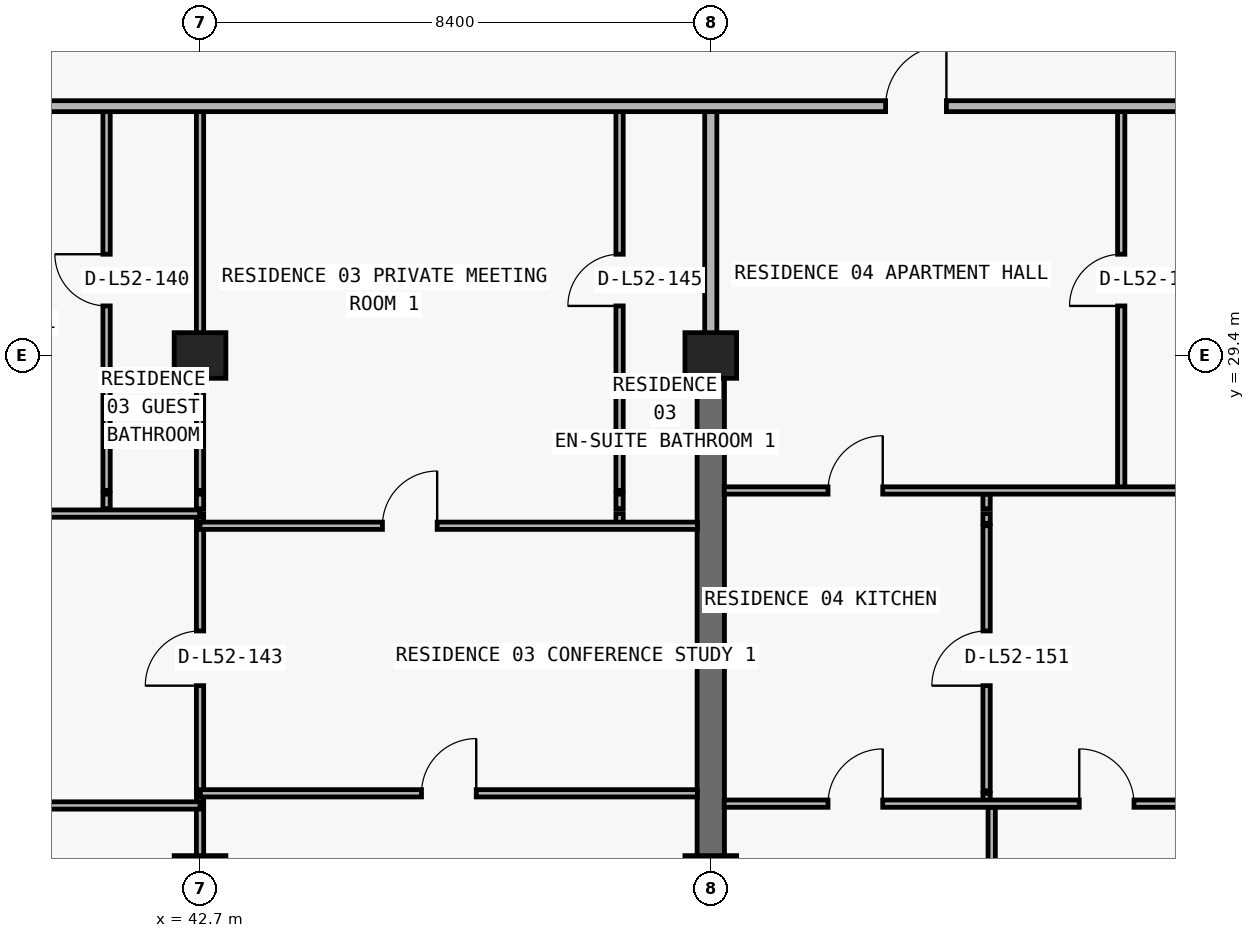
"""IFC4 building model, lengths in metres.
Left out: names, types, materials, properties, quantities, classifications, styles, units other than length and angle.
Written with IfcOpenShell. Run it as: python <this file> out.ifc"""

import sys

from ifc_helpers import new_model, si_unit, direction, frame, frame_2d, origin, origin_2d, place, context, subcontext, project, spatial, rectangle, extrude, element, fill, save


model = new_model("IFC4")
c1 = context("Model", 3, precision=1e-05, world=origin(), true_north=direction((0.0, 1.0)))
c2 = subcontext(c1, "Body", "Model", "MODEL_VIEW")
j1 = project(units=[si_unit("LENGTHUNIT", "METRE"), si_unit("PLANEANGLEUNIT", "RADIAN")], contexts=[c1])
p1 = place(None, origin())
s1 = spatial("IfcSite", under=j1, at=p1, CompositionType="ELEMENT")
p2 = place(p1, origin())
s2 = spatial("IfcBuilding", under=s1, at=p2, CompositionType="ELEMENT")
p3 = place(p2, frame((0.0, 0.0, 188.4)))
s3 = spatial("IfcBuildingStorey", under=s2, at=p3, CompositionType="ELEMENT", Elevation=188.4)
for number, where, z_axis, x_axis in (
    (1, (42.7, 20.8, 0.0), (0.0, 0.0, 1.0), (1.0, 0.0, 0.0)),
    (2, (51.1, 20.8, 0.0), (0.0, 0.0, 1.0), (1.0, 0.0, 0.0)),
    (3, (42.7, 29.4, 0.0), (0.0, 0.0, 1.0), (1.0, 0.0, 0.0)),
    (4, (51.1, 29.4, 0.0), (0.0, 0.0, 1.0), (1.0, 0.0, 0.0)),
):
    element("IfcColumn", number, at=place(p3, frame(where, z_axis=z_axis, x_axis=x_axis)), inside=s3, PredefinedType="COLUMN", context=c2, shape_type="SweptSolid", body=[
        extrude(rectangle(XDim=0.85, YDim=0.75, at=origin_2d()), origin(), (0.0, 0.0, 1.0), 3.05),
    ])
p4 = place(p3, frame((51.1, 20.8, 0.0), z_axis=(0.0, 0.0, 1.0), x_axis=(0.0, 1.0, 0.0)))
e5 = element("IfcWall", 5, at=p4, inside=s3, PredefinedType="SHEAR", context=c2, shape_type="SweptSolid", body=[
    extrude(rectangle(XDim=8.6, YDim=0.45, at=frame_2d((4.3, 0.0))), origin(), (0.0, 0.0, 1.0), 3.05),
])
p5 = place(p3, frame((41.163, 26.88, 0.0), z_axis=(0.0, 0.0, 1.0), x_axis=(0.0, 1.0, 0.0)))
e6 = element("IfcWall", 6, at=p5, inside=s3, PredefinedType="PARTITIONING", context=c2, shape_type="SweptSolid", body=[
    extrude(rectangle(XDim=0.24, YDim=0.12, at=frame_2d((0.12, 0.0))), origin(), (0.0, 0.0, 1.0), 3.05),
])
p6 = place(p3, frame((41.163, 27.18, 0.0), z_axis=(0.0, 0.0, 1.0), x_axis=(0.0, 1.0, 0.0)))
e7 = element("IfcWall", 7, at=p6, inside=s3, PredefinedType="PARTITIONING", context=c2, shape_type="SweptSolid", body=[
    extrude(rectangle(XDim=6.32, YDim=0.12, at=frame_2d((3.16, 0.0))), origin(), (0.0, 0.0, 1.0), 3.05),
])
p7 = place(p6, frame((3.035, 0.0, 0.0)))
e8 = element("IfcOpeningElement", 8, at=p7, cuts=e7, PredefinedType="OPENING", context=c2, shape_type="SweptSolid", body=[
    extrude(rectangle(XDim=0.85, YDim=2.1, at=frame_2d((0.425, 1.05))), frame((0.0, 0.07, 0.0), z_axis=(0.0, -1.0, 0.0), x_axis=(1.0, 0.0, 0.0)), (0.0, 0.0, 1.0), 0.14),
])
p8 = place(p3, frame((42.7, 11.24, 0.0), z_axis=(0.0, 0.0, 1.0), x_axis=(0.0, 1.0, 0.0)))
e9 = element("IfcWall", 9, at=p8, inside=s3, PredefinedType="PARTITIONING", context=c2, shape_type="SweptSolid", body=[
    extrude(rectangle(XDim=10.73, YDim=0.12, at=frame_2d((5.365, 0.0))), origin(), (0.0, 0.0, 1.0), 2.263),
])
p9 = place(p3, frame((42.7, 22.04, 0.0), z_axis=(0.0, 0.0, 1.0), x_axis=(0.0, 1.0, 0.0)))
e10 = element("IfcWall", 10, at=p9, inside=s3, PredefinedType="PARTITIONING", context=c2, shape_type="SweptSolid", body=[
    extrude(rectangle(XDim=0.16, YDim=0.12, at=frame_2d((0.08, 0.0))), origin(), (0.0, 0.0, 1.0), 2.263),
])
p10 = place(p3, frame((42.7, 22.24, 0.0), z_axis=(0.0, 0.0, 1.0), x_axis=(0.0, 1.0, 0.0)))
e11 = element("IfcWall", 11, at=p10, inside=s3, PredefinedType="PARTITIONING", context=c2, shape_type="SweptSolid", body=[
    extrude(rectangle(XDim=4.36, YDim=0.12, at=frame_2d((2.18, 0.0))), origin(), (0.0, 0.0, 1.0), 2.263),
])
p11 = place(p10, frame((1.73, 0.0, 0.0)))
e12 = element("IfcOpeningElement", 12, at=p11, cuts=e11, PredefinedType="OPENING", context=c2, shape_type="SweptSolid", body=[
    extrude(rectangle(XDim=0.9, YDim=2.15, at=frame_2d((0.45, 1.075))), frame((0.0, 0.07, 0.0), z_axis=(0.0, -1.0, 0.0), x_axis=(1.0, 0.0, 0.0)), (0.0, 0.0, 1.0), 0.14),
])
p12 = place(p3, frame((42.7, 26.64, 0.0), z_axis=(0.0, 0.0, 1.0), x_axis=(0.0, 1.0, 0.0)))
e13 = element("IfcWall", 13, at=p12, inside=s3, PredefinedType="PARTITIONING", context=c2, shape_type="SweptSolid", body=[
    extrude(rectangle(XDim=0.16, YDim=0.12, at=frame_2d((0.08, 0.0))), origin(), (0.0, 0.0, 1.0), 2.263),
])
p13 = place(p3, frame((42.7, 26.88, 0.0), z_axis=(0.0, 0.0, 1.0), x_axis=(0.0, 1.0, 0.0)))
e14 = element("IfcWall", 14, at=p13, inside=s3, PredefinedType="PARTITIONING", context=c2, shape_type="SweptSolid", body=[
    extrude(rectangle(XDim=0.24, YDim=0.12, at=frame_2d((0.12, 0.0))), origin(), (0.0, 0.0, 1.0), 2.263),
])
p14 = place(p3, frame((42.7, 27.18, 0.0), z_axis=(0.0, 0.0, 1.0), x_axis=(0.0, 1.0, 0.0)))
e15 = element("IfcWall", 15, at=p14, inside=s3, PredefinedType="PARTITIONING", context=c2, shape_type="SweptSolid", body=[
    extrude(rectangle(XDim=6.32, YDim=0.12, at=frame_2d((3.16, 0.0))), origin(), (0.0, 0.0, 1.0), 2.263),
])
p15 = place(p3, frame((49.6, 26.64, 0.0), z_axis=(0.0, 0.0, 1.0), x_axis=(0.0, 1.0, 0.0)))
e16 = element("IfcWall", 16, at=p15, inside=s3, PredefinedType="PARTITIONING", context=c2, shape_type="SweptSolid", body=[
    extrude(rectangle(XDim=0.16, YDim=0.12, at=frame_2d((0.08, 0.0))), origin(), (0.0, 0.0, 1.0), 3.05),
])
p16 = place(p3, frame((49.6, 26.88, 0.0), z_axis=(0.0, 0.0, 1.0), x_axis=(0.0, 1.0, 0.0)))
e17 = element("IfcWall", 17, at=p16, inside=s3, PredefinedType="PARTITIONING", context=c2, shape_type="SweptSolid", body=[
    extrude(rectangle(XDim=0.24, YDim=0.12, at=frame_2d((0.12, 0.0))), origin(), (0.0, 0.0, 1.0), 3.05),
])
p17 = place(p3, frame((49.6, 27.18, 0.0), z_axis=(0.0, 0.0, 1.0), x_axis=(0.0, 1.0, 0.0)))
e18 = element("IfcWall", 18, at=p17, inside=s3, PredefinedType="PARTITIONING", context=c2, shape_type="SweptSolid", body=[
    extrude(rectangle(XDim=6.32, YDim=0.12, at=frame_2d((3.16, 0.0))), origin(), (0.0, 0.0, 1.0), 3.05),
])
p18 = place(p17, frame((3.035, 0.0, 0.0)))
e19 = element("IfcOpeningElement", 19, at=p18, cuts=e18, PredefinedType="OPENING", context=c2, shape_type="SweptSolid", body=[
    extrude(rectangle(XDim=0.85, YDim=2.1, at=frame_2d((0.425, 1.05))), frame((0.0, 0.07, 0.0), z_axis=(0.0, -1.0, 0.0), x_axis=(1.0, 0.0, 0.0)), (0.0, 0.0, 1.0), 0.14),
])
p19 = place(p3, frame((51.1, 29.405, 0.0), z_axis=(0.0, 0.0, 1.0), x_axis=(0.0, 1.0, 0.0)))
e20 = element("IfcWall", 20, at=p19, inside=s3, PredefinedType="PARTITIONING", context=c2, shape_type="SweptSolid", body=[
    extrude(rectangle(XDim=4.095, YDim=0.2, at=frame_2d((2.047, 0.0))), origin(), (0.0, 0.0, 1.0), 2.335),
])
p20 = place(p3, frame((55.636, 22.04, 0.0), z_axis=(0.0, 0.0, 1.0), x_axis=(0.0, 1.0, 0.0)))
e21 = element("IfcWall", 21, at=p20, inside=s3, PredefinedType="PARTITIONING", context=c2, shape_type="SweptSolid", body=[
    extrude(rectangle(XDim=0.16, YDim=0.12, at=frame_2d((0.08, 0.0))), origin(), (0.0, 0.0, 1.0), 3.05),
])
p21 = place(p3, frame((55.636, 22.24, 0.0), z_axis=(0.0, 0.0, 1.0), x_axis=(0.0, 1.0, 0.0)))
e22 = element("IfcWall", 22, at=p21, inside=s3, PredefinedType="PARTITIONING", context=c2, shape_type="SweptSolid", body=[
    extrude(rectangle(XDim=4.36, YDim=0.12, at=frame_2d((2.18, 0.0))), origin(), (0.0, 0.0, 1.0), 3.05),
])
p22 = place(p21, frame((1.73, 0.0, 0.0)))
e23 = element("IfcOpeningElement", 23, at=p22, cuts=e22, PredefinedType="OPENING", context=c2, shape_type="SweptSolid", body=[
    extrude(rectangle(XDim=0.9, YDim=2.15, at=frame_2d((0.45, 1.075))), frame((0.0, 0.07, 0.0), z_axis=(0.0, -1.0, 0.0), x_axis=(1.0, 0.0, 0.0)), (0.0, 0.0, 1.0), 0.14),
])
p23 = place(p3, frame((55.636, 26.64, 0.0), z_axis=(0.0, 0.0, 1.0), x_axis=(0.0, 1.0, 0.0)))
e24 = element("IfcWall", 24, at=p23, inside=s3, PredefinedType="PARTITIONING", context=c2, shape_type="SweptSolid", body=[
    extrude(rectangle(XDim=0.16, YDim=0.12, at=frame_2d((0.08, 0.0))), origin(), (0.0, 0.0, 1.0), 3.05),
])
p24 = place(p3, frame((55.636, 26.88, 0.0), z_axis=(0.0, 0.0, 1.0), x_axis=(0.0, 1.0, 0.0)))
e25 = element("IfcWall", 25, at=p24, inside=s3, PredefinedType="PARTITIONING", context=c2, shape_type="SweptSolid", body=[
    extrude(rectangle(XDim=0.24, YDim=0.12, at=frame_2d((0.12, 0.0))), origin(), (0.0, 0.0, 1.0), 3.05),
])
p25 = place(p3, frame((55.72, 11.24, 0.0), z_axis=(0.0, 0.0, 1.0), x_axis=(0.0, 1.0, 0.0)))
e26 = element("IfcWall", 26, at=p25, inside=s3, PredefinedType="PARTITIONING", context=c2, shape_type="SweptSolid", body=[
    extrude(rectangle(XDim=10.73, YDim=0.12, at=frame_2d((5.365, 0.0))), origin(), (0.0, 0.0, 1.0), 3.05),
])
p26 = place(p3, frame((57.85, 27.18, 0.0), z_axis=(0.0, 0.0, 1.0), x_axis=(0.0, 1.0, 0.0)))
e27 = element("IfcWall", 27, at=p26, inside=s3, PredefinedType="PARTITIONING", context=c2, shape_type="SweptSolid", body=[
    extrude(rectangle(XDim=6.32, YDim=0.12, at=frame_2d((3.16, 0.0))), origin(), (0.0, 0.0, 1.0), 3.05),
])
p27 = place(p26, frame((3.035, 0.0, 0.0)))
e28 = element("IfcOpeningElement", 28, at=p27, cuts=e27, PredefinedType="OPENING", context=c2, shape_type="SweptSolid", body=[
    extrude(rectangle(XDim=0.85, YDim=2.1, at=frame_2d((0.425, 1.05))), frame((0.0, 0.07, 0.0), z_axis=(0.0, -1.0, 0.0), x_axis=(1.0, 0.0, 0.0)), (0.0, 0.0, 1.0), 0.14),
])
p28 = place(p3, frame((35.105, 22.0, 0.0), z_axis=(0.0, 0.0, 1.0), x_axis=(1.0, 0.0, 0.0)))
e29 = element("IfcWall", 29, at=p28, inside=s3, PredefinedType="PARTITIONING", context=c2, shape_type="SweptSolid", body=[
    extrude(rectangle(XDim=7.595, YDim=0.12, at=frame_2d((3.797, 0.0))), origin(), (0.0, 0.0, 1.0), 3.05),
])
p29 = place(p28, frame((3.347, 0.0, 0.0)))
e30 = element("IfcOpeningElement", 30, at=p29, cuts=e29, PredefinedType="OPENING", context=c2, shape_type="SweptSolid", body=[
    extrude(rectangle(XDim=0.9, YDim=2.15, at=frame_2d((0.45, 1.075))), frame((0.0, 0.07, 0.0), z_axis=(0.0, -1.0, 0.0), x_axis=(1.0, 0.0, 0.0)), (0.0, 0.0, 1.0), 0.14),
])
p30 = place(p3, frame((51.32, 22.03, 0.0), z_axis=(0.0, 0.0, 1.0), x_axis=(1.0, 0.0, 0.0)))
e31 = element("IfcWall", 31, at=p30, inside=s3, PredefinedType="PARTITIONING", context=c2, shape_type="SweptSolid", body=[
    extrude(rectangle(XDim=8.18, YDim=0.12, at=frame_2d((4.09, 0.0))), origin(), (0.0, 0.0, 1.0), 3.05),
])
p31 = place(p30, frame((1.708, 0.0, 0.0)))
e32 = element("IfcOpeningElement", 32, at=p31, cuts=e31, PredefinedType="OPENING", context=c2, shape_type="SweptSolid", body=[
    extrude(rectangle(XDim=0.9, YDim=2.15, at=frame_2d((0.45, 1.075))), frame((0.0, 0.07, 0.0), z_axis=(0.0, -1.0, 0.0), x_axis=(1.0, 0.0, 0.0)), (0.0, 0.0, 1.0), 0.14),
])
p32 = place(p30, frame((5.84, 0.0, 0.0)))
e33 = element("IfcOpeningElement", 33, at=p32, cuts=e31, PredefinedType="OPENING", context=c2, shape_type="SweptSolid", body=[
    extrude(rectangle(XDim=0.9, YDim=2.15, at=frame_2d((0.45, 1.075))), frame((0.0, 0.07, 0.0), z_axis=(0.0, -1.0, 0.0), x_axis=(1.0, 0.0, 0.0)), (0.0, 0.0, 1.0), 0.14),
])
p33 = place(p3, frame((42.705, 22.2, 0.0), z_axis=(0.0, 0.0, 1.0), x_axis=(1.0, 0.0, 0.0)))
e34 = element("IfcWall", 34, at=p33, inside=s3, PredefinedType="PARTITIONING", context=c2, shape_type="SweptSolid", body=[
    extrude(rectangle(XDim=8.175, YDim=0.12, at=frame_2d((4.087, 0.0))), origin(), (0.0, 0.0, 1.0), 3.05),
])
p34 = place(p33, frame((3.637, 0.0, 0.0)))
e35 = element("IfcOpeningElement", 35, at=p34, cuts=e34, PredefinedType="OPENING", context=c2, shape_type="SweptSolid", body=[
    extrude(rectangle(XDim=0.9, YDim=2.15, at=frame_2d((0.45, 1.075))), frame((0.0, 0.07, 0.0), z_axis=(0.0, -1.0, 0.0), x_axis=(1.0, 0.0, 0.0)), (0.0, 0.0, 1.0), 0.14),
])
p35 = place(p3, frame((42.7, 26.6, 0.0), z_axis=(0.0, 0.0, 1.0), x_axis=(1.0, 0.0, 0.0)))
e36 = element("IfcWall", 36, at=p35, inside=s3, PredefinedType="PARTITIONING", context=c2, shape_type="SweptSolid", body=[
    extrude(rectangle(XDim=8.18, YDim=0.12, at=frame_2d((4.09, 0.0))), origin(), (0.0, 0.0, 1.0), 3.05),
])
p36 = place(p35, frame((3.0, 0.0, 0.0)))
e37 = element("IfcOpeningElement", 37, at=p36, cuts=e36, PredefinedType="OPENING", context=c2, shape_type="SweptSolid", body=[
    extrude(rectangle(XDim=0.9, YDim=2.15, at=frame_2d((0.45, 1.075))), frame((0.0, 0.07, 0.0), z_axis=(0.0, -1.0, 0.0), x_axis=(1.0, 0.0, 0.0)), (0.0, 0.0, 1.0), 0.14),
])
p37 = place(p3, frame((35.1, 26.8, 0.0), z_axis=(0.0, 0.0, 1.0), x_axis=(1.0, 0.0, 0.0)))
e38 = element("IfcWall", 38, at=p37, inside=s3, PredefinedType="PARTITIONING", context=c2, shape_type="SweptSolid", body=[
    extrude(rectangle(XDim=7.595, YDim=0.12, at=frame_2d((3.797, 0.0))), origin(), (0.0, 0.0, 1.0), 3.05),
])
p38 = place(p37, frame((2.582, 0.0, 0.0)))
e39 = element("IfcOpeningElement", 39, at=p38, cuts=e38, PredefinedType="OPENING", context=c2, shape_type="SweptSolid", body=[
    extrude(rectangle(XDim=0.9, YDim=2.15, at=frame_2d((0.45, 1.075))), frame((0.0, 0.07, 0.0), z_axis=(0.0, -1.0, 0.0), x_axis=(1.0, 0.0, 0.0)), (0.0, 0.0, 1.0), 0.14),
])
p39 = place(p3, frame((51.32, 27.18, 0.0), z_axis=(0.0, 0.0, 1.0), x_axis=(1.0, 0.0, 0.0)))
e40 = element("IfcWall", 40, at=p39, inside=s3, PredefinedType="PARTITIONING", context=c2, shape_type="SweptSolid", body=[
    extrude(rectangle(XDim=8.18, YDim=0.12, at=frame_2d((4.09, 0.0))), origin(), (0.0, 0.0, 1.0), 3.05),
])
p40 = place(p39, frame((1.708, 0.0, 0.0)))
e41 = element("IfcOpeningElement", 41, at=p40, cuts=e40, PredefinedType="OPENING", context=c2, shape_type="SweptSolid", body=[
    extrude(rectangle(XDim=0.9, YDim=2.15, at=frame_2d((0.45, 1.075))), frame((0.0, 0.07, 0.0), z_axis=(0.0, -1.0, 0.0), x_axis=(1.0, 0.0, 0.0)), (0.0, 0.0, 1.0), 0.14),
])
p41 = place(p3, frame((31.4, 33.5, 0.0), z_axis=(0.0, 0.0, 1.0), x_axis=(1.0, 0.0, 0.0)))
e42 = element("IfcWall", 42, at=p41, inside=s3, PredefinedType="PARTITIONING", context=c2, shape_type="SweptSolid", body=[
    extrude(rectangle(XDim=36.3, YDim=0.18, at=frame_2d((18.15, 0.0))), origin(), (0.0, 0.0, 1.0), 3.05),
])
p42 = place(p41, frame((6.231, 0.0, 0.0)))
e43 = element("IfcOpeningElement", 43, at=p42, cuts=e42, PredefinedType="OPENING", context=c2, shape_type="SweptSolid", body=[
    extrude(rectangle(XDim=1.0, YDim=2.2, at=frame_2d((0.5, 1.1))), frame((0.0, 0.1, 0.0), z_axis=(0.0, -1.0, 0.0), x_axis=(1.0, 0.0, 0.0)), (0.0, 0.0, 1.0), 0.2),
])
p43 = place(p41, frame((22.575, 0.0, 0.0)))
e44 = element("IfcOpeningElement", 44, at=p43, cuts=e42, PredefinedType="OPENING", context=c2, shape_type="SweptSolid", body=[
    extrude(rectangle(XDim=1.0, YDim=2.2, at=frame_2d((0.5, 1.1))), frame((0.0, 0.1, 0.0), z_axis=(0.0, -1.0, 0.0), x_axis=(1.0, 0.0, 0.0)), (0.0, 0.0, 1.0), 0.2),
])
p44 = place(p41, frame((30.875, 0.0, 0.0)))
e45 = element("IfcOpeningElement", 45, at=p44, cuts=e42, PredefinedType="OPENING", context=c2, shape_type="SweptSolid", body=[
    extrude(rectangle(XDim=1.0, YDim=2.2, at=frame_2d((0.5, 1.1))), frame((0.0, 0.1, 0.0), z_axis=(0.0, -1.0, 0.0), x_axis=(1.0, 0.0, 0.0)), (0.0, 0.0, 1.0), 0.2),
])
p45 = place(p7, origin())
e46 = element("IfcDoor", 46, at=p45, inside=s3, OperationType="SINGLE_SWING_RIGHT", PredefinedType="DOOR", context=c2, shape_type="SweptSolid", body=[
    extrude(rectangle(XDim=0.85, YDim=2.1, at=frame_2d((0.425, 1.05))), frame((0.0, 0.025, 0.0), z_axis=(0.0, -1.0, 0.0), x_axis=(1.0, 0.0, 0.0)), (0.0, 0.0, 1.0), 0.05),
])
fill(e8, e46)
p46 = place(p11, origin())
e47 = element("IfcDoor", 47, at=p46, inside=s3, OperationType="SINGLE_SWING_LEFT", PredefinedType="DOOR", context=c2, shape_type="SweptSolid", body=[
    extrude(rectangle(XDim=0.9, YDim=2.15, at=frame_2d((0.45, 1.075))), frame((0.0, 0.025, 0.0), z_axis=(0.0, -1.0, 0.0), x_axis=(1.0, 0.0, 0.0)), (0.0, 0.0, 1.0), 0.05),
])
fill(e12, e47)
p47 = place(p36, origin())
e48 = element("IfcDoor", 48, at=p47, inside=s3, OperationType="SINGLE_SWING_RIGHT", PredefinedType="DOOR", context=c2, shape_type="SweptSolid", body=[
    extrude(rectangle(XDim=0.9, YDim=2.15, at=frame_2d((0.45, 1.075))), frame((0.0, 0.025, 0.0), z_axis=(0.0, -1.0, 0.0), x_axis=(1.0, 0.0, 0.0)), (0.0, 0.0, 1.0), 0.05),
])
fill(e37, e48)
p48 = place(p18, origin())
e49 = element("IfcDoor", 49, at=p48, inside=s3, OperationType="SINGLE_SWING_LEFT", PredefinedType="DOOR", context=c2, shape_type="SweptSolid", body=[
    extrude(rectangle(XDim=0.85, YDim=2.1, at=frame_2d((0.425, 1.05))), frame((0.0, 0.025, 0.0), z_axis=(0.0, -1.0, 0.0), x_axis=(1.0, 0.0, 0.0)), (0.0, 0.0, 1.0), 0.05),
])
fill(e19, e49)
p49 = place(p34, origin())
e50 = element("IfcDoor", 50, at=p49, inside=s3, OperationType="SINGLE_SWING_RIGHT", PredefinedType="DOOR", context=c2, shape_type="SweptSolid", body=[
    extrude(rectangle(XDim=0.9, YDim=2.15, at=frame_2d((0.45, 1.075))), frame((0.0, 0.025, 0.0), z_axis=(0.0, -1.0, 0.0), x_axis=(1.0, 0.0, 0.0)), (0.0, 0.0, 1.0), 0.05),
])
fill(e35, e50)
p50 = place(p43, origin())
e51 = element("IfcDoor", 51, at=p50, inside=s3, OperationType="SINGLE_SWING_RIGHT", PredefinedType="DOOR", context=c2, shape_type="SweptSolid", body=[
    extrude(rectangle(XDim=1.0, YDim=2.2, at=frame_2d((0.5, 1.1))), frame((0.0, 0.025, 0.0), z_axis=(0.0, -1.0, 0.0), x_axis=(1.0, 0.0, 0.0)), (0.0, 0.0, 1.0), 0.05),
])
fill(e44, e51)
p51 = place(p27, origin())
e52 = element("IfcDoor", 52, at=p51, inside=s3, OperationType="SINGLE_SWING_LEFT", PredefinedType="DOOR", context=c2, shape_type="SweptSolid", body=[
    extrude(rectangle(XDim=0.85, YDim=2.1, at=frame_2d((0.425, 1.05))), frame((0.0, 0.025, 0.0), z_axis=(0.0, -1.0, 0.0), x_axis=(1.0, 0.0, 0.0)), (0.0, 0.0, 1.0), 0.05),
])
fill(e28, e52)
p52 = place(p40, origin())
e53 = element("IfcDoor", 53, at=p52, inside=s3, OperationType="SINGLE_SWING_RIGHT", PredefinedType="DOOR", context=c2, shape_type="SweptSolid", body=[
    extrude(rectangle(XDim=0.9, YDim=2.15, at=frame_2d((0.45, 1.075))), frame((0.0, 0.025, 0.0), z_axis=(0.0, -1.0, 0.0), x_axis=(1.0, 0.0, 0.0)), (0.0, 0.0, 1.0), 0.05),
])
fill(e41, e53)
p53 = place(p22, origin())
e54 = element("IfcDoor", 54, at=p53, inside=s3, OperationType="SINGLE_SWING_LEFT", PredefinedType="DOOR", context=c2, shape_type="SweptSolid", body=[
    extrude(rectangle(XDim=0.9, YDim=2.15, at=frame_2d((0.45, 1.075))), frame((0.0, 0.025, 0.0), z_axis=(0.0, -1.0, 0.0), x_axis=(1.0, 0.0, 0.0)), (0.0, 0.0, 1.0), 0.05),
])
fill(e23, e54)
p54 = place(p31, origin())
e55 = element("IfcDoor", 55, at=p54, inside=s3, OperationType="SINGLE_SWING_RIGHT", PredefinedType="DOOR", context=c2, shape_type="SweptSolid", body=[
    extrude(rectangle(XDim=0.9, YDim=2.15, at=frame_2d((0.45, 1.075))), frame((0.0, 0.025, 0.0), z_axis=(0.0, -1.0, 0.0), x_axis=(1.0, 0.0, 0.0)), (0.0, 0.0, 1.0), 0.05),
])
fill(e32, e55)
p55 = place(p32, origin())
e56 = element("IfcDoor", 56, at=p55, inside=s3, OperationType="SINGLE_SWING_LEFT", PredefinedType="DOOR", context=c2, shape_type="SweptSolid", body=[
    extrude(rectangle(XDim=0.9, YDim=2.15, at=frame_2d((0.45, 1.075))), frame((0.0, 0.025, 0.0), z_axis=(0.0, -1.0, 0.0), x_axis=(1.0, 0.0, 0.0)), (0.0, 0.0, 1.0), 0.05),
])
fill(e33, e56)
save(model, sys.argv[1])
